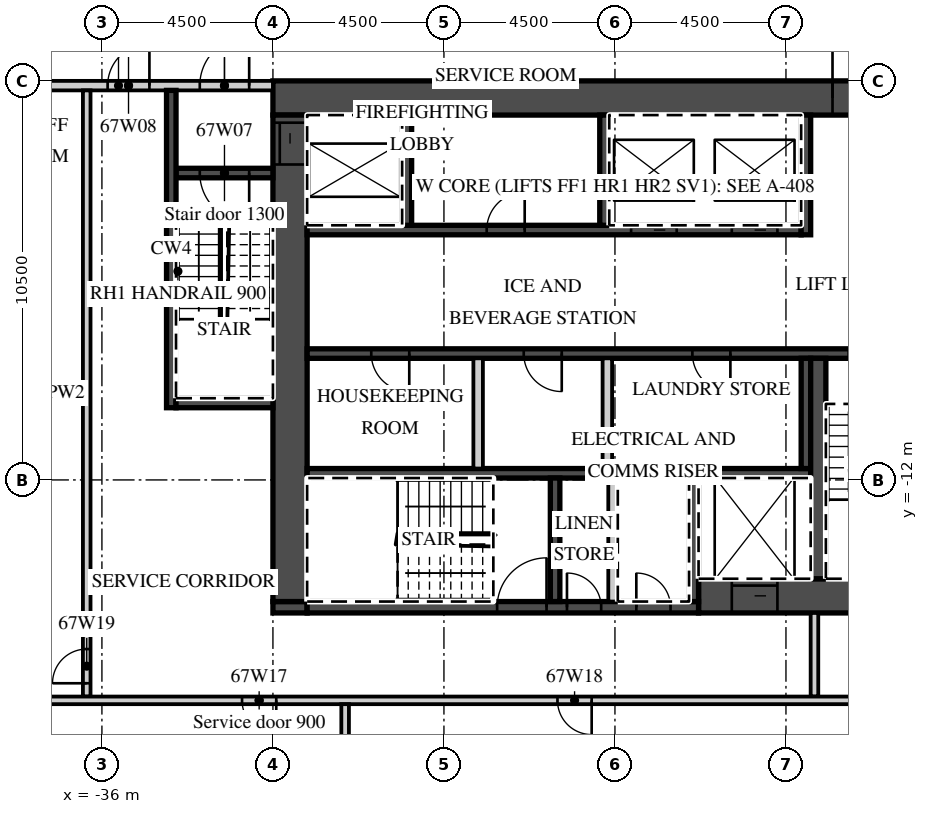
"""IFC4 building model, lengths in metres.
Left out: names, types, materials, properties, quantities, classifications, styles, units other than length and angle.
Written with IfcOpenShell. Run it as: python <this file> out.ifc"""

import sys

from ifc_helpers import new_model, si_unit, direction, frame, frame_2d, origin, place, context, subcontext, project, spatial, rectangle, extrude, element, fill, save


model = new_model("IFC4")
c1 = context("Model", 3, precision=1e-05, world=origin(), true_north=direction((0.0, 1.0)))
c2 = subcontext(c1, "Body", "Model", "MODEL_VIEW")
j1 = project(units=[si_unit("LENGTHUNIT", "METRE"), si_unit("PLANEANGLEUNIT", "RADIAN")], contexts=[c1])
p1 = place(None, origin())
s1 = spatial("IfcSite", under=j1, at=p1, CompositionType="ELEMENT")
p2 = place(p1, origin())
s2 = spatial("IfcBuilding", under=s1, at=p2, CompositionType="ELEMENT")
p3 = place(p2, frame((0.0, 0.0, 271.8)))
s3 = spatial("IfcBuildingStorey", under=s2, at=p3, CompositionType="ELEMENT", Elevation=271.8)
p4 = place(p3, frame((-31.5, -1.95, 0.0), z_axis=(0.0, 0.0, 1.0), x_axis=(1.0, 0.0, 0.0)))
e1 = element("IfcWall", 1, at=p4, inside=s3, PredefinedType="SHEAR", context=c2, shape_type="SweptSolid", body=[
    extrude(rectangle(XDim=18.0, YDim=0.9, at=frame_2d((9.0, 0.0))), origin(), (0.0, 0.0, 1.0), 3.02),
])
p5 = place(p4, frame((14.725, 0.0, 0.0)))
e2 = element("IfcOpeningElement", 2, at=p5, cuts=e1, PredefinedType="OPENING", context=c2, shape_type="SweptSolid", body=[
    extrude(rectangle(XDim=1.8, YDim=2.1, at=frame_2d((0.9, 1.05))), frame((0.0, 0.46, 0.0), z_axis=(0.0, -1.0, 0.0), x_axis=(1.0, 0.0, 0.0)), (0.0, 0.0, 1.0), 0.92),
])
p6 = place(p3, frame((-20.3, -15.05, 0.0), z_axis=(0.0, 0.0, 1.0), x_axis=(1.0, 0.0, 0.0)))
e3 = element("IfcWall", 3, at=p6, inside=s3, PredefinedType="SHEAR", context=c2, shape_type="SweptSolid", body=[
    extrude(rectangle(XDim=6.8, YDim=0.9, at=frame_2d((3.4, 0.0))), origin(), (0.0, 0.0, 1.0), 3.02),
])
p7 = place(p6, frame((0.875, 0.0, 0.0)))
e4 = element("IfcOpeningElement", 4, at=p7, cuts=e3, PredefinedType="OPENING", context=c2, shape_type="SweptSolid", body=[
    extrude(rectangle(XDim=1.2, YDim=2.1, at=frame_2d((0.6, 1.05))), frame((0.0, 0.46, 0.0), z_axis=(0.0, -1.0, 0.0), x_axis=(1.0, 0.0, 0.0)), (0.0, 0.0, 1.0), 0.92),
])
p8 = place(p3, frame((-31.5, -15.35, 0.0), z_axis=(0.0, 0.0, 1.0), x_axis=(1.0, 0.0, 0.0)))
e5 = element("IfcWall", 5, at=p8, inside=s3, PredefinedType="SHEAR", context=c2, shape_type="SweptSolid", body=[
    extrude(rectangle(XDim=0.9, YDim=0.3, at=frame_2d((0.45, 0.0))), origin(), (0.0, 0.0, 1.0), 3.02),
])
p9 = place(p3, frame((-30.6, -15.35, 0.0), z_axis=(0.0, 0.0, 1.0), x_axis=(1.0, 0.0, 0.0)))
e6 = element("IfcWall", 6, at=p9, inside=s3, PredefinedType="SHEAR", context=c2, shape_type="SweptSolid", body=[
    extrude(rectangle(XDim=10.3, YDim=0.3, at=frame_2d((5.15, 0.0))), origin(), (0.0, 0.0, 1.0), 3.02),
])
p10 = place(p9, frame((5.0, 0.0, 0.0)))
e7 = element("IfcOpeningElement", 7, at=p10, cuts=e6, PredefinedType="OPENING", context=c2, shape_type="SweptSolid", body=[
    extrude(rectangle(XDim=1.3, YDim=2.1, at=frame_2d((0.65, 1.05))), frame((0.0, 0.16, 0.0), z_axis=(0.0, -1.0, 0.0), x_axis=(1.0, 0.0, 0.0)), (0.0, 0.0, 1.0), 0.32),
])
p11 = place(p9, frame((6.837, 0.0, 0.0)))
e8 = element("IfcOpeningElement", 8, at=p11, cuts=e6, PredefinedType="OPENING", context=c2, shape_type="SweptSolid", body=[
    extrude(rectangle(XDim=0.9, YDim=2.1, at=frame_2d((0.45, 1.05))), frame((0.0, 0.16, 0.0), z_axis=(0.0, -1.0, 0.0), x_axis=(1.0, 0.0, 0.0)), (0.0, 0.0, 1.0), 0.32),
])
p12 = place(p9, frame((8.663, 0.0, 0.0)))
e9 = element("IfcOpeningElement", 9, at=p12, cuts=e6, PredefinedType="OPENING", context=c2, shape_type="SweptSolid", body=[
    extrude(rectangle(XDim=0.9, YDim=2.1, at=frame_2d((0.45, 1.05))), frame((0.0, 0.16, 0.0), z_axis=(0.0, -1.0, 0.0), x_axis=(1.0, 0.0, 0.0)), (0.0, 0.0, 1.0), 0.32),
])
p13 = place(p3, frame((-31.05, -15.2, 0.0), z_axis=(0.0, 0.0, 1.0), x_axis=(0.0, 1.0, 0.0)))
e10 = element("IfcWall", 10, at=p13, inside=s3, PredefinedType="SHEAR", context=c2, shape_type="SweptSolid", body=[
    extrude(rectangle(XDim=12.8, YDim=0.9, at=frame_2d((6.4, 0.0))), origin(), (0.0, 0.0, 1.0), 3.02),
])
p14 = place(p13, frame((11.5, 0.0, 0.0)))
e11 = element("IfcOpeningElement", 11, at=p14, cuts=e10, PredefinedType="OPENING", context=c2, shape_type="SweptSolid", body=[
    extrude(rectangle(XDim=1.1, YDim=2.1, at=frame_2d((0.55, 1.05))), frame((0.0, 0.46, 0.0), z_axis=(0.0, -1.0, 0.0), x_axis=(1.0, 0.0, 0.0)), (0.0, 0.0, 1.0), 0.92),
])
p15 = place(p3, frame((-30.6, -5.425, 0.0), z_axis=(0.0, 0.0, 1.0), x_axis=(1.0, 0.0, 0.0)))
e12 = element("IfcWall", 12, at=p15, inside=s3, PredefinedType="SHEAR", context=c2, shape_type="SweptSolid", body=[
    extrude(rectangle(XDim=13.0, YDim=0.25, at=frame_2d((6.5, 0.0))), origin(), (0.0, 0.0, 1.0), 3.02),
])
p16 = place(p15, frame((8.525, 0.0, 0.0)))
e13 = element("IfcOpeningElement", 13, at=p16, cuts=e12, PredefinedType="OPENING", context=c2, shape_type="SweptSolid", body=[
    extrude(rectangle(XDim=1.2, YDim=2.1, at=frame_2d((0.6, 1.05))), frame((0.0, 0.135, 0.0), z_axis=(0.0, -1.0, 0.0), x_axis=(1.0, 0.0, 0.0)), (0.0, 0.0, 1.0), 0.27),
])
p17 = place(p15, frame((11.175, 0.0, 0.0)))
e14 = element("IfcOpeningElement", 14, at=p17, cuts=e12, PredefinedType="OPENING", context=c2, shape_type="SweptSolid", body=[
    extrude(rectangle(XDim=1.2, YDim=2.1, at=frame_2d((0.6, 1.05))), frame((0.0, 0.135, 0.0), z_axis=(0.0, -1.0, 0.0), x_axis=(1.0, 0.0, 0.0)), (0.0, 0.0, 1.0), 0.27),
])
p18 = place(p15, frame((4.725, 0.0, 0.0)))
e15 = element("IfcOpeningElement", 15, at=p18, cuts=e12, PredefinedType="OPENING", context=c2, shape_type="SweptSolid", body=[
    extrude(rectangle(XDim=1.0, YDim=2.1, at=frame_2d((0.5, 1.05))), frame((0.0, 0.135, 0.0), z_axis=(0.0, -1.0, 0.0), x_axis=(1.0, 0.0, 0.0)), (0.0, 0.0, 1.0), 0.27),
])
p19 = place(p3, frame((-17.475, -5.55, 0.0), z_axis=(0.0, 0.0, 1.0), x_axis=(0.0, 1.0, 0.0)))
e16 = element("IfcWall", 16, at=p19, inside=s3, PredefinedType="SHEAR", context=c2, shape_type="SweptSolid", body=[
    extrude(rectangle(XDim=3.15, YDim=0.25, at=frame_2d((1.575, 0.0))), origin(), (0.0, 0.0, 1.0), 3.02),
])
for number, where, z_axis, x_axis in (
    (17, (-27.975, -5.3, 0.0), (0.0, 0.0, 1.0), (0.0, 1.0, 0.0)),
    (18, (-22.775, -5.3, 0.0), (0.0, 0.0, 1.0), (0.0, 1.0, 0.0)),
):
    element("IfcWall", number, at=place(p3, frame(where, z_axis=z_axis, x_axis=x_axis)), inside=s3, PredefinedType="SHEAR", context=c2, shape_type="SweptSolid", body=[
        extrude(rectangle(XDim=2.9, YDim=0.25, at=frame_2d((1.45, 0.0))), origin(), (0.0, 0.0, 1.0), 3.02),
    ])
p20 = place(p3, frame((-30.6, -8.675, 0.0), z_axis=(0.0, 0.0, 1.0), x_axis=(1.0, 0.0, 0.0)))
e19 = element("IfcWall", 19, at=p20, inside=s3, PredefinedType="SHEAR", context=c2, shape_type="SweptSolid", body=[
    extrude(rectangle(XDim=16.2, YDim=0.25, at=frame_2d((8.1, 0.0))), origin(), (0.0, 0.0, 1.0), 3.02),
])
p21 = place(p20, frame((14.25, 0.0, 0.0)))
e20 = element("IfcOpeningElement", 20, at=p21, cuts=e19, PredefinedType="OPENING", context=c2, shape_type="SweptSolid", body=[
    extrude(rectangle(XDim=1.3, YDim=2.1, at=frame_2d((0.65, 1.05))), frame((0.0, 0.135, 0.0), z_axis=(0.0, -1.0, 0.0), x_axis=(1.0, 0.0, 0.0)), (0.0, 0.0, 1.0), 0.27),
])
p22 = place(p20, frame((1.688, 0.0, 0.0)))
e21 = element("IfcOpeningElement", 21, at=p22, cuts=e19, PredefinedType="OPENING", context=c2, shape_type="SweptSolid", body=[
    extrude(rectangle(XDim=1.0, YDim=2.1, at=frame_2d((0.5, 1.05))), frame((0.0, 0.135, 0.0), z_axis=(0.0, -1.0, 0.0), x_axis=(1.0, 0.0, 0.0)), (0.0, 0.0, 1.0), 0.27),
])
p23 = place(p20, frame((5.7, 0.0, 0.0)))
e22 = element("IfcOpeningElement", 22, at=p23, cuts=e19, PredefinedType="OPENING", context=c2, shape_type="SweptSolid", body=[
    extrude(rectangle(XDim=1.0, YDim=2.1, at=frame_2d((0.5, 1.05))), frame((0.0, 0.135, 0.0), z_axis=(0.0, -1.0, 0.0), x_axis=(1.0, 0.0, 0.0)), (0.0, 0.0, 1.0), 0.27),
])
p24 = place(p20, frame((10.137, 0.0, 0.0)))
e23 = element("IfcOpeningElement", 23, at=p24, cuts=e19, PredefinedType="OPENING", context=c2, shape_type="SweptSolid", body=[
    extrude(rectangle(XDim=1.0, YDim=2.1, at=frame_2d((0.5, 1.05))), frame((0.0, 0.135, 0.0), z_axis=(0.0, -1.0, 0.0), x_axis=(1.0, 0.0, 0.0)), (0.0, 0.0, 1.0), 0.27),
])
p25 = place(p3, frame((-30.6, -11.825, 0.0), z_axis=(0.0, 0.0, 1.0), x_axis=(1.0, 0.0, 0.0)))
e24 = element("IfcWall", 24, at=p25, inside=s3, PredefinedType="SHEAR", context=c2, shape_type="SweptSolid", body=[
    extrude(rectangle(XDim=13.25, YDim=0.25, at=frame_2d((6.625, 0.0))), origin(), (0.0, 0.0, 1.0), 3.02),
])
p26 = place(p3, frame((-17.475, -11.7, 0.0), z_axis=(0.0, 0.0, 1.0), x_axis=(0.0, 1.0, 0.0)))
e25 = element("IfcWall", 25, at=p26, inside=s3, PredefinedType="SHEAR", context=c2, shape_type="SweptSolid", body=[
    extrude(rectangle(XDim=2.9, YDim=0.25, at=frame_2d((1.45, 0.0))), origin(), (0.0, 0.0, 1.0), 3.02),
])
for number, where, z_axis, x_axis in (
    (26, (-26.1, -11.7, 0.0), (0.0, 0.0, 1.0), (0.0, 1.0, 0.0)),
    (27, (-22.7, -11.7, 0.0), (0.0, 0.0, 1.0), (0.0, 1.0, 0.0)),
):
    element("IfcWall", number, at=place(p3, frame(where, z_axis=z_axis, x_axis=x_axis)), inside=s3, PredefinedType="PARTITIONING", context=c2, shape_type="SweptSolid", body=[
        extrude(rectangle(XDim=2.9, YDim=0.25, at=frame_2d((1.45, 0.0))), origin(), (0.0, 0.0, 1.0), 3.02),
    ])
p27 = place(p3, frame((-17.15, -14.6, 0.0), z_axis=(0.0, 0.0, 1.0), x_axis=(0.0, 1.0, 0.0)))
e28 = element("IfcWall", 28, at=p27, inside=s3, PredefinedType="SHEAR", context=c2, shape_type="SweptSolid", body=[
    extrude(rectangle(XDim=5.8, YDim=0.4, at=frame_2d((2.9, 0.0))), origin(), (0.0, 0.0, 1.0), 3.02),
])
for number, where, z_axis, x_axis in (
    (29, (-20.425, -15.2, 0.0), (0.0, 0.0, 1.0), (0.0, 1.0, 0.0)),
    (30, (-24.075, -15.2, 0.0), (0.0, 0.0, 1.0), (0.0, 1.0, 0.0)),
):
    element("IfcWall", number, at=place(p3, frame(where, z_axis=z_axis, x_axis=x_axis)), inside=s3, PredefinedType="SHEAR", context=c2, shape_type="SweptSolid", body=[
        extrude(rectangle(XDim=3.25, YDim=0.25, at=frame_2d((1.625, 0.0))), origin(), (0.0, 0.0, 1.0), 3.02),
    ])
p28 = place(p3, frame((-22.55, -15.2, 0.0), z_axis=(0.0, 0.0, 1.0), x_axis=(0.0, 1.0, 0.0)))
e31 = element("IfcWall", 31, at=p28, inside=s3, PredefinedType="PARTITIONING", context=c2, shape_type="SweptSolid", body=[
    extrude(rectangle(XDim=3.25, YDim=0.25, at=frame_2d((1.625, 0.0))), origin(), (0.0, 0.0, 1.0), 3.02),
])
p29 = place(p3, frame((-39.627, -1.625, 0.0), z_axis=(0.0, 0.0, 1.0), x_axis=(1.0, 0.0, 0.0)))
e32 = element("IfcWall", 32, at=p29, inside=s3, PredefinedType="PARTITIONING", context=c2, shape_type="SweptSolid", body=[
    extrude(rectangle(XDim=8.127, YDim=0.25, at=frame_2d((4.063, 0.0))), origin(), (0.0, 0.0, 1.0), 3.02),
])
p30 = place(p29, frame((6.202, 0.0, 0.0)))
e33 = element("IfcOpeningElement", 33, at=p30, cuts=e32, PredefinedType="OPENING", context=c2, shape_type="SweptSolid", body=[
    extrude(rectangle(XDim=1.3, YDim=2.1, at=frame_2d((0.65, 1.05))), frame((0.0, 0.135, 0.0), z_axis=(0.0, -1.0, 0.0), x_axis=(1.0, 0.0, 0.0)), (0.0, 0.0, 1.0), 0.27),
])
p31 = place(p29, frame((3.777, 0.0, 0.0)))
e34 = element("IfcOpeningElement", 34, at=p31, cuts=e32, PredefinedType="OPENING", context=c2, shape_type="SweptSolid", body=[
    extrude(rectangle(XDim=1.1, YDim=2.1, at=frame_2d((0.55, 1.05))), frame((0.0, 0.135, 0.0), z_axis=(0.0, -1.0, 0.0), x_axis=(1.0, 0.0, 0.0)), (0.0, 0.0, 1.0), 0.27),
])
p32 = place(p3, frame((-34.05, -3.925, 0.0), z_axis=(0.0, 0.0, 1.0), x_axis=(1.0, 0.0, 0.0)))
e35 = element("IfcWall", 35, at=p32, inside=s3, PredefinedType="SHEAR", context=c2, shape_type="SweptSolid", body=[
    extrude(rectangle(XDim=2.55, YDim=0.25, at=frame_2d((1.275, 0.0))), origin(), (0.0, 0.0, 1.0), 3.02),
])
p33 = place(p32, frame((0.625, 0.0, 0.0)))
e36 = element("IfcOpeningElement", 36, at=p33, cuts=e35, PredefinedType="OPENING", context=c2, shape_type="SweptSolid", body=[
    extrude(rectangle(XDim=1.3, YDim=2.1, at=frame_2d((0.65, 1.05))), frame((0.0, 0.135, 0.0), z_axis=(0.0, -1.0, 0.0), x_axis=(1.0, 0.0, 0.0)), (0.0, 0.0, 1.0), 0.27),
])
p34 = place(p3, frame((-34.175, -10.1, 0.0), z_axis=(0.0, 0.0, 1.0), x_axis=(0.0, 1.0, 0.0)))
e37 = element("IfcWall", 37, at=p34, inside=s3, PredefinedType="SHEAR", context=c2, shape_type="SweptSolid", body=[
    extrude(rectangle(XDim=8.35, YDim=0.25, at=frame_2d((4.175, 0.0))), origin(), (0.0, 0.0, 1.0), 3.02),
])
p35 = place(p3, frame((-34.05, -9.975, 0.0), z_axis=(0.0, 0.0, 1.0), x_axis=(1.0, 0.0, 0.0)))
e38 = element("IfcWall", 38, at=p35, inside=s3, PredefinedType="SHEAR", context=c2, shape_type="SweptSolid", body=[
    extrude(rectangle(XDim=2.55, YDim=0.25, at=frame_2d((1.275, 0.0))), origin(), (0.0, 0.0, 1.0), 3.02),
])
p36 = place(p3, frame((-17.25, -17.7, 0.0), z_axis=(0.0, 0.0, 1.0), x_axis=(0.0, 1.0, 0.0)))
e39 = element("IfcWall", 39, at=p36, inside=s3, PredefinedType="PARTITIONING", context=c2, shape_type="SweptSolid", body=[
    extrude(rectangle(XDim=2.2, YDim=0.2, at=frame_2d((1.1, 0.0))), origin(), (0.0, 0.0, 1.0), 3.02),
])
p37 = place(p3, frame((-36.4, -17.7, 0.0), z_axis=(0.0, 0.0, 1.0), x_axis=(0.0, 1.0, 0.0)))
e40 = element("IfcWall", 40, at=p37, inside=s3, PredefinedType="PARTITIONING", context=c2, shape_type="SweptSolid", body=[
    extrude(rectangle(XDim=15.95, YDim=0.2, at=frame_2d((7.975, 0.0))), origin(), (0.0, 0.0, 1.0), 3.02),
])
p38 = place(p37, frame((0.35, 0.0, 0.0)))
e41 = element("IfcOpeningElement", 41, at=p38, cuts=e40, PredefinedType="OPENING", context=c2, shape_type="SweptSolid", body=[
    extrude(rectangle(XDim=0.9, YDim=2.1, at=frame_2d((0.45, 1.05))), frame((0.0, 0.11, 0.0), z_axis=(0.0, -1.0, 0.0), x_axis=(1.0, 0.0, 0.0)), (0.0, 0.0, 1.0), 0.22),
])
p39 = place(p3, frame((-38.07, -17.8, 0.0), z_axis=(0.0, 0.0, 1.0), x_axis=(1.0, 0.0, 0.0)))
e42 = element("IfcWall", 42, at=p39, inside=s3, PredefinedType="PARTITIONING", context=c2, shape_type="SweptSolid", body=[
    extrude(rectangle(XDim=24.47, YDim=0.2, at=frame_2d((12.235, 0.0))), origin(), (0.0, 0.0, 1.0), 3.02),
])
p40 = place(p39, frame((5.757, 0.0, 0.0)))
e43 = element("IfcOpeningElement", 43, at=p40, cuts=e42, PredefinedType="OPENING", context=c2, shape_type="SweptSolid", body=[
    extrude(rectangle(XDim=0.9, YDim=2.1, at=frame_2d((0.45, 1.05))), frame((0.0, 0.11, 0.0), z_axis=(0.0, -1.0, 0.0), x_axis=(1.0, 0.0, 0.0)), (0.0, 0.0, 1.0), 0.22),
])
p41 = place(p39, frame((14.057, 0.0, 0.0)))
e44 = element("IfcOpeningElement", 44, at=p41, cuts=e42, PredefinedType="OPENING", context=c2, shape_type="SweptSolid", body=[
    extrude(rectangle(XDim=0.9, YDim=2.1, at=frame_2d((0.45, 1.05))), frame((0.0, 0.11, 0.0), z_axis=(0.0, -1.0, 0.0), x_axis=(1.0, 0.0, 0.0)), (0.0, 0.0, 1.0), 0.22),
])
p42 = place(p3, frame((-29.6, -22.947, 0.0), z_axis=(0.0, 0.0, 1.0), x_axis=(0.0, 1.0, 0.0)))
e45 = element("IfcWall", 45, at=p42, inside=s3, PredefinedType="PARTITIONING", context=c2, shape_type="SweptSolid", body=[
    extrude(rectangle(XDim=5.047, YDim=0.2, at=frame_2d((2.523, 0.0))), origin(), (0.0, 0.0, 1.0), 3.02),
])
p43 = place(p16, origin())
e46 = element("IfcDoor", 46, at=p43, inside=s3, OperationType="SLIDING_TO_LEFT", PredefinedType="DOOR", context=c2, shape_type="SweptSolid", body=[
    extrude(rectangle(XDim=1.2, YDim=2.1, at=frame_2d((0.6, 1.05))), frame((0.0, 0.025, 0.0), z_axis=(0.0, -1.0, 0.0), x_axis=(1.0, 0.0, 0.0)), (0.0, 0.0, 1.0), 0.05),
])
fill(e13, e46)
p44 = place(p17, origin())
e47 = element("IfcDoor", 47, at=p44, inside=s3, OperationType="SLIDING_TO_RIGHT", PredefinedType="DOOR", context=c2, shape_type="SweptSolid", body=[
    extrude(rectangle(XDim=1.2, YDim=2.1, at=frame_2d((0.6, 1.05))), frame((0.0, 0.025, 0.0), z_axis=(0.0, -1.0, 0.0), x_axis=(1.0, 0.0, 0.0)), (0.0, 0.0, 1.0), 0.05),
])
fill(e14, e47)
p45 = place(p7, origin())
e48 = element("IfcDoor", 48, at=p45, inside=s3, OperationType="SLIDING_TO_LEFT", PredefinedType="DOOR", context=c2, shape_type="SweptSolid", body=[
    extrude(rectangle(XDim=1.2, YDim=2.1, at=frame_2d((0.6, 1.05))), frame((0.0, 0.025, 0.0), z_axis=(0.0, -1.0, 0.0), x_axis=(1.0, 0.0, 0.0)), (0.0, 0.0, 1.0), 0.05),
])
fill(e4, e48)
p46 = place(p14, origin())
e49 = element("IfcDoor", 49, at=p46, inside=s3, OperationType="SLIDING_TO_RIGHT", PredefinedType="DOOR", context=c2, shape_type="SweptSolid", body=[
    extrude(rectangle(XDim=1.1, YDim=2.1, at=frame_2d((0.55, 1.05))), frame((0.0, 0.025, 0.0), z_axis=(0.0, -1.0, 0.0), x_axis=(1.0, 0.0, 0.0)), (0.0, 0.0, 1.0), 0.05),
])
fill(e11, e49)
p47 = place(p5, origin())
e50 = element("IfcDoor", 50, at=p47, inside=s3, OperationType="DOUBLE_DOOR_DOUBLE_SWING", PredefinedType="DOOR", context=c2, shape_type="SweptSolid", body=[
    extrude(rectangle(XDim=1.8, YDim=2.1, at=frame_2d((0.9, 1.05))), frame((0.0, 0.025, 0.0), z_axis=(0.0, -1.0, 0.0), x_axis=(1.0, 0.0, 0.0)), (0.0, 0.0, 1.0), 0.05),
])
fill(e2, e50)
p48 = place(p30, origin())
e51 = element("IfcDoor", 51, at=p48, inside=s3, OperationType="SINGLE_SWING_RIGHT", PredefinedType="DOOR", context=c2, shape_type="SweptSolid", body=[
    extrude(rectangle(XDim=1.3, YDim=2.1, at=frame_2d((0.65, 1.05))), frame((0.0, 0.025, 0.0), z_axis=(0.0, -1.0, 0.0), x_axis=(1.0, 0.0, 0.0)), (0.0, 0.0, 1.0), 0.05),
])
fill(e33, e51)
p49 = place(p33, origin())
e52 = element("IfcDoor", 52, at=p49, inside=s3, OperationType="SINGLE_SWING_RIGHT", PredefinedType="DOOR", context=c2, shape_type="SweptSolid", body=[
    extrude(rectangle(XDim=1.3, YDim=2.1, at=frame_2d((0.65, 1.05))), frame((0.0, 0.025, 0.0), z_axis=(0.0, -1.0, 0.0), x_axis=(1.0, 0.0, 0.0)), (0.0, 0.0, 1.0), 0.05),
])
fill(e36, e52)
p50 = place(p31, origin())
e53 = element("IfcDoor", 53, at=p50, inside=s3, OperationType="SINGLE_SWING_RIGHT", PredefinedType="DOOR", context=c2, shape_type="SweptSolid", body=[
    extrude(rectangle(XDim=1.1, YDim=2.1, at=frame_2d((0.55, 1.05))), frame((0.0, 0.025, 0.0), z_axis=(0.0, -1.0, 0.0), x_axis=(1.0, 0.0, 0.0)), (0.0, 0.0, 1.0), 0.05),
])
fill(e34, e53)
p51 = place(p21, origin())
e54 = element("IfcDoor", 54, at=p51, inside=s3, OperationType="SINGLE_SWING_RIGHT", PredefinedType="DOOR", context=c2, shape_type="SweptSolid", body=[
    extrude(rectangle(XDim=1.3, YDim=2.1, at=frame_2d((0.65, 1.05))), frame((0.0, 0.025, 0.0), z_axis=(0.0, -1.0, 0.0), x_axis=(1.0, 0.0, 0.0)), (0.0, 0.0, 1.0), 0.05),
])
fill(e20, e54)
p52 = place(p10, origin())
e55 = element("IfcDoor", 55, at=p52, inside=s3, OperationType="SINGLE_SWING_RIGHT", PredefinedType="DOOR", context=c2, shape_type="SweptSolid", body=[
    extrude(rectangle(XDim=1.3, YDim=2.1, at=frame_2d((0.65, 1.05))), frame((0.0, 0.025, 0.0), z_axis=(0.0, -1.0, 0.0), x_axis=(1.0, 0.0, 0.0)), (0.0, 0.0, 1.0), 0.05),
])
fill(e7, e55)
p53 = place(p11, origin())
e56 = element("IfcDoor", 56, at=p53, inside=s3, OperationType="SINGLE_SWING_LEFT", PredefinedType="DOOR", context=c2, shape_type="SweptSolid", body=[
    extrude(rectangle(XDim=0.9, YDim=2.1, at=frame_2d((0.45, 1.05))), frame((0.0, 0.025, 0.0), z_axis=(0.0, -1.0, 0.0), x_axis=(1.0, 0.0, 0.0)), (0.0, 0.0, 1.0), 0.05),
])
fill(e8, e56)
p54 = place(p12, origin())
e57 = element("IfcDoor", 57, at=p54, inside=s3, OperationType="SINGLE_SWING_LEFT", PredefinedType="DOOR", context=c2, shape_type="SweptSolid", body=[
    extrude(rectangle(XDim=0.9, YDim=2.1, at=frame_2d((0.45, 1.05))), frame((0.0, 0.025, 0.0), z_axis=(0.0, -1.0, 0.0), x_axis=(1.0, 0.0, 0.0)), (0.0, 0.0, 1.0), 0.05),
])
fill(e9, e57)
p55 = place(p22, origin())
e58 = element("IfcDoor", 58, at=p55, inside=s3, OperationType="SINGLE_SWING_RIGHT", PredefinedType="DOOR", context=c2, shape_type="SweptSolid", body=[
    extrude(rectangle(XDim=1.0, YDim=2.1, at=frame_2d((0.5, 1.05))), frame((0.0, 0.025, 0.0), z_axis=(0.0, -1.0, 0.0), x_axis=(1.0, 0.0, 0.0)), (0.0, 0.0, 1.0), 0.05),
])
fill(e21, e58)
p56 = place(p23, origin())
e59 = element("IfcDoor", 59, at=p56, inside=s3, OperationType="SINGLE_SWING_RIGHT", PredefinedType="DOOR", context=c2, shape_type="SweptSolid", body=[
    extrude(rectangle(XDim=1.0, YDim=2.1, at=frame_2d((0.5, 1.05))), frame((0.0, 0.025, 0.0), z_axis=(0.0, -1.0, 0.0), x_axis=(1.0, 0.0, 0.0)), (0.0, 0.0, 1.0), 0.05),
])
fill(e22, e59)
p57 = place(p24, origin())
e60 = element("IfcDoor", 60, at=p57, inside=s3, OperationType="SINGLE_SWING_RIGHT", PredefinedType="DOOR", context=c2, shape_type="SweptSolid", body=[
    extrude(rectangle(XDim=1.0, YDim=2.1, at=frame_2d((0.5, 1.05))), frame((0.0, 0.025, 0.0), z_axis=(0.0, -1.0, 0.0), x_axis=(1.0, 0.0, 0.0)), (0.0, 0.0, 1.0), 0.05),
])
fill(e23, e60)
p58 = place(p18, origin())
e61 = element("IfcDoor", 61, at=p58, inside=s3, OperationType="SINGLE_SWING_RIGHT", PredefinedType="DOOR", context=c2, shape_type="SweptSolid", body=[
    extrude(rectangle(XDim=1.0, YDim=2.1, at=frame_2d((0.5, 1.05))), frame((0.0, 0.025, 0.0), z_axis=(0.0, -1.0, 0.0), x_axis=(1.0, 0.0, 0.0)), (0.0, 0.0, 1.0), 0.05),
])
fill(e15, e61)
p59 = place(p40, origin())
e62 = element("IfcDoor", 62, at=p59, inside=s3, OperationType="SINGLE_SWING_RIGHT", PredefinedType="DOOR", context=c2, shape_type="SweptSolid", body=[
    extrude(rectangle(XDim=0.9, YDim=2.1, at=frame_2d((0.45, 1.05))), frame((0.0, 0.025, 0.0), z_axis=(0.0, -1.0, 0.0), x_axis=(1.0, 0.0, 0.0)), (0.0, 0.0, 1.0), 0.05),
])
fill(e43, e62)
p60 = place(p41, origin())
e63 = element("IfcDoor", 63, at=p60, inside=s3, OperationType="SINGLE_SWING_RIGHT", PredefinedType="DOOR", context=c2, shape_type="SweptSolid", body=[
    extrude(rectangle(XDim=0.9, YDim=2.1, at=frame_2d((0.45, 1.05))), frame((0.0, 0.025, 0.0), z_axis=(0.0, -1.0, 0.0), x_axis=(1.0, 0.0, 0.0)), (0.0, 0.0, 1.0), 0.05),
])
fill(e44, e63)
p61 = place(p38, origin())
e64 = element("IfcDoor", 64, at=p61, inside=s3, OperationType="SINGLE_SWING_LEFT", PredefinedType="DOOR", context=c2, shape_type="SweptSolid", body=[
    extrude(rectangle(XDim=0.9, YDim=2.1, at=frame_2d((0.45, 1.05))), frame((0.0, 0.025, 0.0), z_axis=(0.0, -1.0, 0.0), x_axis=(1.0, 0.0, 0.0)), (0.0, 0.0, 1.0), 0.05),
])
fill(e41, e64)
save(model, sys.argv[1])
